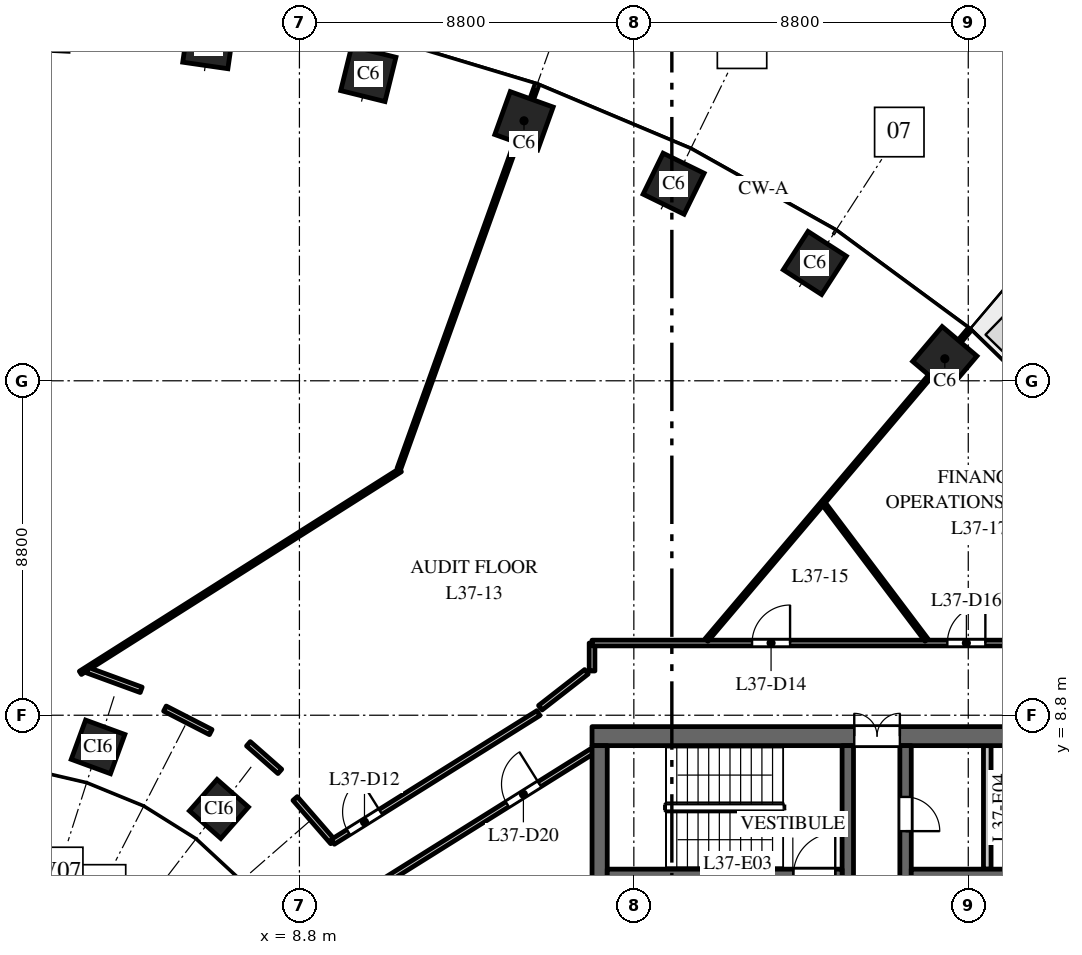
"""IFC4 building model, lengths in metres.
Left out: names, types, materials, properties, quantities, classifications, styles, units other than length and angle.
Written with IfcOpenShell. Run it as: python <this file> out.ifc"""

import sys

from ifc_helpers import new_model, si_unit, direction, frame, frame_2d, origin, origin_2d, place, context, subcontext, project, spatial, rectangle, extrude, element, fill, save


model = new_model("IFC4")
c1 = context("Model", 3, precision=1e-05, world=origin(), true_north=direction((0.0, 1.0)))
c2 = subcontext(c1, "Body", "Model", "MODEL_VIEW")
j1 = project(units=[si_unit("LENGTHUNIT", "METRE"), si_unit("PLANEANGLEUNIT", "RADIAN")], contexts=[c1])
p1 = place(None, origin())
s1 = spatial("IfcSite", under=j1, at=p1, CompositionType="ELEMENT")
p2 = place(p1, origin())
s2 = spatial("IfcBuilding", under=s1, at=p2, CompositionType="ELEMENT")
p3 = place(p2, frame((0.0, 0.0, 162.0)))
s3 = spatial("IfcBuildingStorey", under=s2, at=p3, CompositionType="ELEMENT", Elevation=162.0)
for number, where, z_axis, x_axis in (
    (1, (25.783, 18.18, 0.0), (0.0, 0.0, 1.0), (-0.763, 0.646, 0.0)),
    (2, (22.362, 20.7, 0.0), (0.0, 0.0, 1.0), (-0.84, 0.542, 0.0)),
    (3, (18.646, 22.785, 0.0), (0.0, 0.0, 1.0), (-0.898, 0.439, 0.0)),
    (4, (14.709, 24.441, 0.0), (0.0, 0.0, 1.0), (-0.941, 0.338, 0.0)),
    (5, (10.613, 25.674, 0.0), (0.0, 0.0, 1.0), (-0.971, 0.24, 0.0)),
    (6, (6.409, 26.491, 0.0), (0.0, 0.0, 1.0), (-0.99, 0.143, 0.0)),
):
    element("IfcColumn", number, at=place(p3, frame(where, z_axis=z_axis, x_axis=x_axis)), inside=s3, PredefinedType="COLUMN", context=c2, shape_type="SweptSolid", body=[
        extrude(rectangle(XDim=1.2, YDim=1.2, at=origin_2d()), origin(), (0.0, 0.0, 1.0), 4.0),
    ])
for number, where, z_axis, x_axis in (
    (7, (6.682, 6.334, 0.0), (0.0, 0.0, 1.0), (-0.751, 0.66, 0.0)),
    (8, (3.501, 7.967, 0.0), (0.0, 0.0, 1.0), (-0.939, 0.344, 0.0)),
):
    element("IfcColumn", number, at=place(p3, frame(where, z_axis=z_axis, x_axis=x_axis)), inside=s3, PredefinedType="COLUMN", context=c2, shape_type="SweptSolid", body=[
        extrude(rectangle(XDim=1.1, YDim=1.1, at=origin_2d()), origin(), (0.0, 0.0, 1.0), 4.0),
    ])
p4 = place(p3, frame((16.5, 8.25, 0.0), z_axis=(0.0, 0.0, 1.0), x_axis=(1.0, 0.0, 0.0)))
e9 = element("IfcWall", 9, at=p4, inside=s3, PredefinedType="SHEAR", context=c2, shape_type="SweptSolid", body=[
    extrude(rectangle(XDim=15.0, YDim=0.5, at=frame_2d((7.5, 0.0))), origin(), (0.0, 0.0, 1.0), 3.7),
])
p5 = place(p4, frame((6.9, 0.0, 0.0)))
e10 = element("IfcOpeningElement", 10, at=p5, cuts=e9, PredefinedType="OPENING", context=c2, shape_type="SweptSolid", body=[
    extrude(rectangle(XDim=1.2, YDim=2.1, at=frame_2d((0.6, 1.05))), frame((0.0, 0.26, 0.0), z_axis=(0.0, -1.0, 0.0), x_axis=(1.0, 0.0, 0.0)), (0.0, 0.0, 1.0), 0.52),
])
p6 = place(p4, frame((12.05, 0.0, 0.0)))
e11 = element("IfcOpeningElement", 11, at=p6, cuts=e9, PredefinedType="OPENING", context=c2, shape_type="SweptSolid", body=[
    extrude(rectangle(XDim=0.9, YDim=2.1, at=frame_2d((0.45, 1.05))), frame((0.0, 0.26, 0.0), z_axis=(0.0, -1.0, 0.0), x_axis=(1.0, 0.0, 0.0)), (0.0, 0.0, 1.0), 0.52),
])
p7 = place(p3, frame((24.75, -8.0, 0.0), z_axis=(0.0, 0.0, 1.0), x_axis=(0.0, 1.0, 0.0)))
e12 = element("IfcWall", 12, at=p7, inside=s3, PredefinedType="SHEAR", context=c2, shape_type="SweptSolid", body=[
    extrude(rectangle(XDim=16.0, YDim=0.3, at=frame_2d((8.0, 0.0))), origin(), (0.0, 0.0, 1.0), 3.7),
])
p8 = place(p7, frame((4.425, 0.0, 0.0)))
e13 = element("IfcOpeningElement", 13, at=p8, cuts=e12, PredefinedType="OPENING", context=c2, shape_type="SweptSolid", body=[
    extrude(rectangle(XDim=1.1, YDim=2.1, at=frame_2d((0.55, 1.05))), frame((0.0, 0.16, 0.0), z_axis=(0.0, -1.0, 0.0), x_axis=(1.0, 0.0, 0.0)), (0.0, 0.0, 1.0), 0.32),
])
p9 = place(p7, frame((7.45, 0.0, 0.0)))
e14 = element("IfcOpeningElement", 14, at=p9, cuts=e12, PredefinedType="OPENING", context=c2, shape_type="SweptSolid", body=[
    extrude(rectangle(XDim=1.1, YDim=2.1, at=frame_2d((0.55, 1.05))), frame((0.0, 0.16, 0.0), z_axis=(0.0, -1.0, 0.0), x_axis=(1.0, 0.0, 0.0)), (0.0, 0.0, 1.0), 0.32),
])
p10 = place(p7, frame((10.475, 0.0, 0.0)))
e15 = element("IfcOpeningElement", 15, at=p10, cuts=e12, PredefinedType="OPENING", context=c2, shape_type="SweptSolid", body=[
    extrude(rectangle(XDim=1.1, YDim=2.1, at=frame_2d((0.55, 1.05))), frame((0.0, 0.16, 0.0), z_axis=(0.0, -1.0, 0.0), x_axis=(1.0, 0.0, 0.0)), (0.0, 0.0, 1.0), 0.32),
])
p11 = place(p7, frame((13.75, 0.0, 0.0)))
e16 = element("IfcOpeningElement", 16, at=p11, cuts=e12, PredefinedType="OPENING", context=c2, shape_type="SweptSolid", body=[
    extrude(rectangle(XDim=0.9, YDim=2.1, at=frame_2d((0.45, 1.05))), frame((0.0, 0.16, 0.0), z_axis=(0.0, -1.0, 0.0), x_axis=(1.0, 0.0, 0.0)), (0.0, 0.0, 1.0), 0.32),
])
p12 = place(p7, frame((1.35, 0.0, 0.0)))
e17 = element("IfcOpeningElement", 17, at=p12, cuts=e12, PredefinedType="OPENING", context=c2, shape_type="SweptSolid", body=[
    extrude(rectangle(XDim=0.9, YDim=2.1, at=frame_2d((0.45, 1.05))), frame((0.0, 0.16, 0.0), z_axis=(0.0, -1.0, 0.0), x_axis=(1.0, 0.0, 0.0)), (0.0, 0.0, 1.0), 0.32),
])
p13 = place(p3, frame((16.7, -8.0, 0.0), z_axis=(0.0, 0.0, 1.0), x_axis=(0.0, 1.0, 0.0)))
e18 = element("IfcWall", 18, at=p13, inside=s3, PredefinedType="SHEAR", context=c2, shape_type="SweptSolid", body=[
    extrude(rectangle(XDim=16.0, YDim=0.4, at=frame_2d((8.0, 0.0))), origin(), (0.0, 0.0, 1.0), 3.7),
])
p14 = place(p3, frame((24.9, 4.6, 0.0), z_axis=(0.0, 0.0, 1.0), x_axis=(1.0, 0.0, 0.0)))
e19 = element("IfcWall", 19, at=p14, inside=s3, PredefinedType="SHEAR", context=c2, shape_type="SweptSolid", body=[
    extrude(rectangle(XDim=6.1, YDim=0.3, at=frame_2d((3.05, 0.0))), origin(), (0.0, 0.0, 1.0), 3.7),
])
p15 = place(p14, frame((4.2, 0.0, 0.0)))
e20 = element("IfcOpeningElement", 20, at=p15, cuts=e19, PredefinedType="OPENING", context=c2, shape_type="SweptSolid", body=[
    extrude(rectangle(XDim=0.9, YDim=2.1, at=frame_2d((0.45, 1.05))), frame((0.0, 0.16, 0.0), z_axis=(0.0, -1.0, 0.0), x_axis=(1.0, 0.0, 0.0)), (0.0, 0.0, 1.0), 0.32),
])
p16 = place(p3, frame((26.9, 4.75, 0.0), z_axis=(0.0, 0.0, 1.0), x_axis=(0.0, 1.0, 0.0)))
e21 = element("IfcWall", 21, at=p16, inside=s3, PredefinedType="PARTITIONING", context=c2, shape_type="SweptSolid", body=[
    extrude(rectangle(XDim=3.25, YDim=0.2, at=frame_2d((1.625, 0.0))), origin(), (0.0, 0.0, 1.0), 3.7),
])
p17 = place(p3, frame((23.23, 2.25, 0.0), z_axis=(0.0, 0.0, 1.0), x_axis=(0.0, 1.0, 0.0)))
e22 = element("IfcWall", 22, at=p17, inside=s3, PredefinedType="SHEAR", context=c2, shape_type="SweptSolid", body=[
    extrude(rectangle(XDim=5.75, YDim=0.3, at=frame_2d((2.875, 0.0))), origin(), (0.0, 0.0, 1.0), 3.7),
])
p18 = place(p17, frame((0.6, 0.0, 0.0)))
e23 = element("IfcOpeningElement", 23, at=p18, cuts=e22, PredefinedType="OPENING", context=c2, shape_type="SweptSolid", body=[
    extrude(rectangle(XDim=1.0, YDim=2.1, at=frame_2d((0.5, 1.05))), frame((0.0, 0.16, 0.0), z_axis=(0.0, -1.0, 0.0), x_axis=(1.0, 0.0, 0.0)), (0.0, 0.0, 1.0), 0.32),
])
p19 = place(p3, frame((16.9, 4.6, 0.0), z_axis=(0.0, 0.0, 1.0), x_axis=(1.0, 0.0, 0.0)))
e24 = element("IfcWall", 24, at=p19, inside=s3, PredefinedType="SHEAR", context=c2, shape_type="SweptSolid", body=[
    extrude(rectangle(XDim=6.18, YDim=0.3, at=frame_2d((3.09, 0.0))), origin(), (0.0, 0.0, 1.0), 3.7),
])
p20 = place(p19, frame((4.9, 0.0, 0.0)))
e25 = element("IfcOpeningElement", 25, at=p20, cuts=e24, PredefinedType="OPENING", context=c2, shape_type="SweptSolid", body=[
    extrude(rectangle(XDim=1.1, YDim=2.1, at=frame_2d((0.55, 1.05))), frame((0.0, 0.16, 0.0), z_axis=(0.0, -1.0, 0.0), x_axis=(1.0, 0.0, 0.0)), (0.0, 0.0, 1.0), 0.32),
])
p21 = place(p3, frame((3.036, 9.915, 0.0), z_axis=(0.0, 0.0, 1.0), x_axis=(0.844792135558, 0.535094615652, 0.0)))
e26 = element("IfcWall", 26, at=p21, inside=s3, PredefinedType="PARTITIONING", context=c2, shape_type="SweptSolid", body=[
    extrude(rectangle(XDim=9.968, YDim=0.1, at=frame_2d((4.984, 0.0))), origin(), (0.0, 0.0, 1.0), 2.85),
])
p22 = place(p3, frame((3.222, 9.986, 0.0), z_axis=(0.0, 0.0, 1.0), x_axis=(0.938967105432, -0.344006940215, 0.0)))
e27 = element("IfcWall", 27, at=p22, inside=s3, PredefinedType="PARTITIONING", context=c2, shape_type="SweptSolid", body=[
    extrude(rectangle(XDim=1.506, YDim=0.15, at=frame_2d((0.753, 0.0))), origin(), (0.0, 0.0, 1.0), 3.7),
])
p23 = place(p3, frame((5.261, 8.975, 0.0), z_axis=(0.0, 0.0, 1.0), x_axis=(0.889472002788, -0.456989667559, 0.0)))
e28 = element("IfcWall", 28, at=p23, inside=s3, PredefinedType="PARTITIONING", context=c2, shape_type="SweptSolid", body=[
    extrude(rectangle(XDim=1.355, YDim=0.15, at=frame_2d((0.677, 0.0))), origin(), (0.0, 0.0, 1.0), 2.85),
])
p24 = place(p3, frame((7.458, 8.049, 0.0), z_axis=(0.0, 0.0, 1.0), x_axis=(0.75060787095, -0.660747927782, 0.0)))
e29 = element("IfcWall", 29, at=p24, inside=s3, PredefinedType="PARTITIONING", context=c2, shape_type="SweptSolid", body=[
    extrude(rectangle(XDim=1.1, YDim=0.15, at=frame_2d((0.55, 0.0))), origin(), (0.0, 0.0, 1.0), 3.7),
])
p25 = place(p3, frame((8.687, 6.609, 0.0), z_axis=(0.0, 0.0, 1.0), x_axis=(0.656454677423, -0.75436546613, 0.0)))
e30 = element("IfcWall", 30, at=p25, inside=s3, PredefinedType="PARTITIONING", context=c2, shape_type="SweptSolid", body=[
    extrude(rectangle(XDim=1.511, YDim=0.15, at=frame_2d((0.755, 0.0))), origin(), (0.0, 0.0, 1.0), 3.7),
])
p26 = place(p3, frame((9.679, 5.469, 0.0), z_axis=(0.0, 0.0, 1.0), x_axis=(0.847602682855, 0.530631408811, 0.0)))
e31 = element("IfcWall", 31, at=p26, inside=s3, PredefinedType="PARTITIONING", context=c2, shape_type="SweptSolid", body=[
    extrude(rectangle(XDim=6.383, YDim=0.15, at=frame_2d((3.191, 0.0))), origin(), (0.0, 0.0, 1.0), 3.7),
])
p27 = place(p26, frame((0.483, 0.0, 0.0)))
e32 = element("IfcOpeningElement", 32, at=p27, cuts=e31, PredefinedType="OPENING", context=c2, shape_type="SweptSolid", body=[
    extrude(rectangle(XDim=1.0, YDim=2.1, at=frame_2d((0.5, 1.05))), frame((0.0, 0.085, 0.0), z_axis=(0.0, -1.0, 0.0), x_axis=(1.0, 0.0, 0.0)), (0.0, 0.0, 1.0), 0.17),
])
p28 = place(p3, frame((10.752, 4.254, 0.0), z_axis=(0.0, 0.0, 1.0), x_axis=(0.847690706888, 0.530490777917, 0.0)))
e33 = element("IfcWall", 33, at=p28, inside=s3, PredefinedType="PARTITIONING", context=c2, shape_type="SweptSolid", body=[
    extrude(rectangle(XDim=6.781, YDim=0.15, at=frame_2d((3.39, 0.0))), origin(), (0.0, 0.0, 1.0), 3.7),
])
p29 = place(p28, frame((4.15, 0.0, 0.0)))
e34 = element("IfcOpeningElement", 34, at=p29, cuts=e33, PredefinedType="OPENING", context=c2, shape_type="SweptSolid", body=[
    extrude(rectangle(XDim=1.0, YDim=2.1, at=frame_2d((0.5, 1.05))), frame((0.0, 0.085, 0.0), z_axis=(0.0, -1.0, 0.0), x_axis=(1.0, 0.0, 0.0)), (0.0, 0.0, 1.0), 0.17),
])
p30 = place(p3, frame((11.417, 15.282, 0.0), z_axis=(0.0, 0.0, 1.0), x_axis=(0.338283704349, 0.941044172912, 0.0)))
e35 = element("IfcWall", 35, at=p30, inside=s3, PredefinedType="PARTITIONING", context=c2, shape_type="SweptSolid", body=[
    extrude(rectangle(XDim=10.734, YDim=0.1, at=frame_2d((5.367, 0.0))), origin(), (0.0, 0.0, 1.0), 2.85),
])
p31 = place(p3, frame((16.5, 9.964, 0.0), z_axis=(0.0, 0.0, 1.0), x_axis=(0.0, 1.0, 0.0)))
e36 = element("IfcWall", 36, at=p31, inside=s3, PredefinedType="PARTITIONING", context=c2, shape_type="SweptSolid", body=[
    extrude(rectangle(XDim=0.736, YDim=0.15, at=frame_2d((0.368, 0.0))), origin(), (0.0, 0.0, 1.0), 3.7),
])
p32 = place(p3, frame((16.5, 10.7, 0.0), z_axis=(0.0, 0.0, 1.0), x_axis=(1.0, 0.0, 0.0)))
e37 = element("IfcWall", 37, at=p32, inside=s3, PredefinedType="PARTITIONING", context=c2, shape_type="SweptSolid", body=[
    extrude(rectangle(XDim=15.0, YDim=0.15, at=frame_2d((7.5, 0.0))), origin(), (0.0, 0.0, 1.0), 2.75),
])
p33 = place(p32, frame((4.211, 0.0, 0.0)))
e38 = element("IfcOpeningElement", 38, at=p33, cuts=e37, PredefinedType="OPENING", context=c2, shape_type="SweptSolid", body=[
    extrude(rectangle(XDim=1.0, YDim=2.1, at=frame_2d((0.5, 1.05))), frame((0.0, 0.085, 0.0), z_axis=(0.0, -1.0, 0.0), x_axis=(1.0, 0.0, 0.0)), (0.0, 0.0, 1.0), 0.17),
])
p34 = place(p32, frame((9.35, 0.0, 0.0)))
e39 = element("IfcOpeningElement", 39, at=p34, cuts=e37, PredefinedType="OPENING", context=c2, shape_type="SweptSolid", body=[
    extrude(rectangle(XDim=1.0, YDim=2.1, at=frame_2d((0.5, 1.05))), frame((0.0, 0.085, 0.0), z_axis=(0.0, -1.0, 0.0), x_axis=(1.0, 0.0, 0.0)), (0.0, 0.0, 1.0), 0.17),
])
p35 = place(p3, frame((19.511, 10.778, 0.0), z_axis=(0.0, 0.0, 1.0), x_axis=(0.646400187952, 0.762998556365, 0.0)))
e40 = element("IfcWall", 40, at=p35, inside=s3, PredefinedType="PARTITIONING", context=c2, shape_type="SweptSolid", body=[
    extrude(rectangle(XDim=10.704, YDim=0.1, at=frame_2d((5.352, 0.0))), origin(), (0.0, 0.0, 1.0), 2.9),
])
p36 = place(p3, frame((22.606, 14.354, 0.0), z_axis=(0.0, 0.0, 1.0), x_axis=(0.602012984229, -0.798486297202, 0.0)))
e41 = element("IfcWall", 41, at=p36, inside=s3, PredefinedType="PARTITIONING", context=c2, shape_type="SweptSolid", body=[
    extrude(rectangle(XDim=4.478, YDim=0.1, at=frame_2d((2.239, 0.0))), origin(), (0.0, 0.0, 1.0), 2.75),
])
p37 = place(p3, frame((15.139, 8.997, 0.0), z_axis=(0.0, 0.0, 1.0), x_axis=(0.788950226826, 0.614457109643, 0.0)))
e42 = element("IfcWall", 42, at=p37, inside=s3, PredefinedType="PARTITIONING", context=c2, shape_type="SweptSolid", body=[
    extrude(rectangle(XDim=1.538, YDim=0.15, at=frame_2d((0.769, 0.0))), origin(), (0.0, 0.0, 1.0), 3.7),
])
p38 = place(p20, origin())
e43 = element("IfcDoor", 43, at=p38, inside=s3, OperationType="SINGLE_SWING_LEFT", PredefinedType="DOOR", context=c2, shape_type="SweptSolid", body=[
    extrude(rectangle(XDim=1.1, YDim=2.1, at=frame_2d((0.55, 1.05))), frame((0.0, 0.025, 0.0), z_axis=(0.0, -1.0, 0.0), x_axis=(1.0, 0.0, 0.0)), (0.0, 0.0, 1.0), 0.05),
])
fill(e25, e43)
p39 = place(p5, origin())
e44 = element("IfcDoor", 44, at=p39, inside=s3, OperationType="DOUBLE_DOOR_DOUBLE_SWING", PredefinedType="DOOR", context=c2, shape_type="SweptSolid", body=[
    extrude(rectangle(XDim=1.2, YDim=2.1, at=frame_2d((0.6, 1.05))), frame((0.0, 0.025, 0.0), z_axis=(0.0, -1.0, 0.0), x_axis=(1.0, 0.0, 0.0)), (0.0, 0.0, 1.0), 0.05),
])
fill(e10, e44)
p40 = place(p11, origin())
e45 = element("IfcDoor", 45, at=p40, inside=s3, OperationType="SINGLE_SWING_LEFT", PredefinedType="DOOR", context=c2, shape_type="SweptSolid", body=[
    extrude(rectangle(XDim=0.9, YDim=2.1, at=frame_2d((0.45, 1.05))), frame((0.0, 0.025, 0.0), z_axis=(0.0, -1.0, 0.0), x_axis=(1.0, 0.0, 0.0)), (0.0, 0.0, 1.0), 0.05),
])
fill(e16, e45)
p41 = place(p27, origin())
e46 = element("IfcDoor", 46, at=p41, inside=s3, OperationType="SINGLE_SWING_RIGHT", PredefinedType="DOOR", context=c2, shape_type="SweptSolid", body=[
    extrude(rectangle(XDim=1.0, YDim=2.1, at=frame_2d((0.5, 1.05))), frame((0.0, 0.025, 0.0), z_axis=(0.0, -1.0, 0.0), x_axis=(1.0, 0.0, 0.0)), (0.0, 0.0, 1.0), 0.05),
])
fill(e32, e46)
p42 = place(p33, origin())
e47 = element("IfcDoor", 47, at=p42, inside=s3, OperationType="SINGLE_SWING_RIGHT", PredefinedType="DOOR", context=c2, shape_type="SweptSolid", body=[
    extrude(rectangle(XDim=1.0, YDim=2.1, at=frame_2d((0.5, 1.05))), frame((0.0, 0.025, 0.0), z_axis=(0.0, -1.0, 0.0), x_axis=(1.0, 0.0, 0.0)), (0.0, 0.0, 1.0), 0.05),
])
fill(e38, e47)
p43 = place(p34, origin())
e48 = element("IfcDoor", 48, at=p43, inside=s3, OperationType="SINGLE_SWING_RIGHT", PredefinedType="DOOR", context=c2, shape_type="SweptSolid", body=[
    extrude(rectangle(XDim=1.0, YDim=2.1, at=frame_2d((0.5, 1.05))), frame((0.0, 0.025, 0.0), z_axis=(0.0, -1.0, 0.0), x_axis=(1.0, 0.0, 0.0)), (0.0, 0.0, 1.0), 0.05),
])
fill(e39, e48)
p44 = place(p29, origin())
e49 = element("IfcDoor", 49, at=p44, inside=s3, OperationType="SINGLE_SWING_RIGHT", PredefinedType="DOOR", context=c2, shape_type="SweptSolid", body=[
    extrude(rectangle(XDim=1.0, YDim=2.1, at=frame_2d((0.5, 1.05))), frame((0.0, 0.025, 0.0), z_axis=(0.0, -1.0, 0.0), x_axis=(1.0, 0.0, 0.0)), (0.0, 0.0, 1.0), 0.05),
])
fill(e34, e49)
save(model, sys.argv[1])
